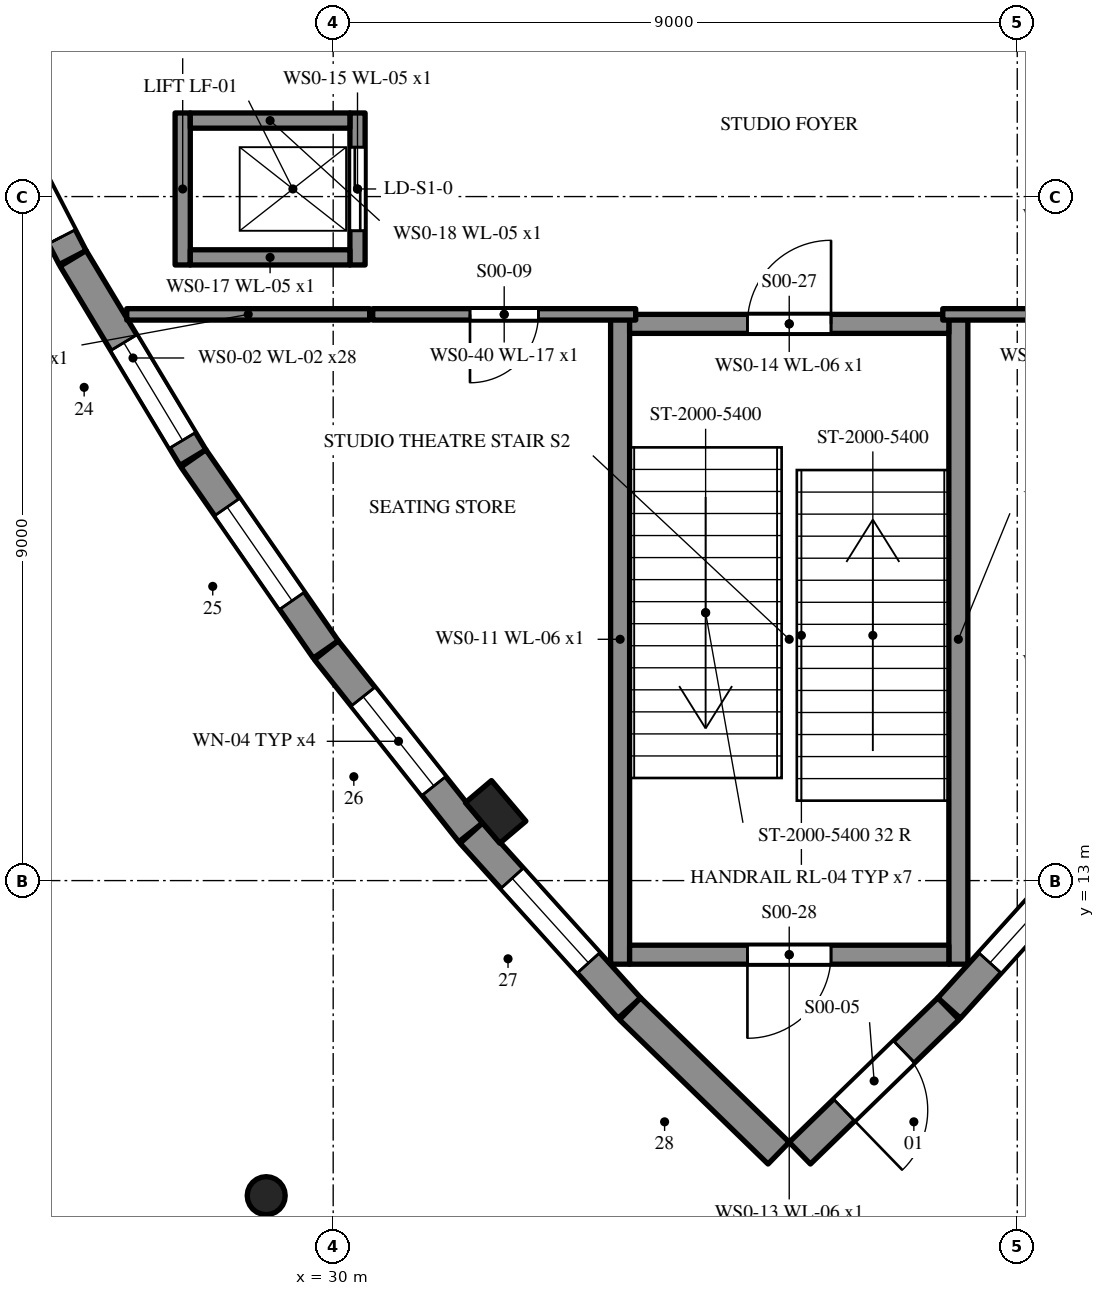
"""IFC4 building model, lengths in metres.
Left out: names, types, materials, properties, quantities, classifications, styles, units other than length and angle.
Written with IfcOpenShell. Run it as: python <this file> out.ifc"""

import sys

from ifc_helpers import new_model, si_unit, direction, frame, frame_2d, origin, origin_2d, place, context, subcontext, project, spatial, rectangle, circle, extrude, element, fill, save


model = new_model("IFC4")
c1 = context("Model", 3, precision=1e-05, world=origin(), true_north=direction((0.0, 1.0)))
c2 = subcontext(c1, "Body", "Model", "MODEL_VIEW")
j1 = project(units=[si_unit("LENGTHUNIT", "METRE"), si_unit("PLANEANGLEUNIT", "RADIAN")], contexts=[c1])
p1 = place(None, origin())
s1 = spatial("IfcSite", under=j1, at=p1, CompositionType="ELEMENT")
p2 = place(p1, origin())
s2 = spatial("IfcBuilding", under=s1, at=p2, CompositionType="ELEMENT")
p3 = place(p2, origin())
s3 = spatial("IfcBuildingStorey", under=s2, at=p3, CompositionType="ELEMENT", Elevation=0.0)
p4 = place(p3, frame((29.119, 8.854, -0.25), z_axis=(0.0, 0.0, 1.0), x_axis=(1.0, 0.0, 0.0)))
e1 = element("IfcColumn", 1, at=p4, inside=s3, PredefinedType="COLUMN", context=c2, shape_type="SweptSolid", body=[
    extrude(circle(Radius=0.25, at=origin_2d()), origin(), (0.0, 0.0, 1.0), 5.45),
])
p5 = place(p3, frame((36.139, 9.414, 0.0), z_axis=(0.0, 0.0, 1.0), x_axis=(0.717243568607, 0.696822547922, 0.0)))
e2 = element("IfcWall", 2, at=p5, inside=s3, PredefinedType="SOLIDWALL", context=c2, shape_type="SweptSolid", body=[
    extrude(rectangle(XDim=2.726, YDim=0.4, at=frame_2d((1.363, 0.0))), origin(), (0.0, 0.0, 1.0), 5.1),
])
p6 = place(p5, frame((0.813, 0.0, 0.0)))
e3 = element("IfcOpeningElement", 3, at=p6, cuts=e2, PredefinedType="OPENING", context=c2, shape_type="SweptSolid", body=[
    extrude(rectangle(XDim=1.1, YDim=2.1, at=frame_2d((0.55, 1.05))), frame((0.0, 0.21, 0.0), z_axis=(0.0, -1.0, 0.0), x_axis=(1.0, 0.0, 0.0)), (0.0, 0.0, 1.0), 0.42),
])
p7 = place(p3, frame((38.104, 11.323, 0.0), z_axis=(0.0, 0.0, 1.0), x_axis=(0.67038553216, 0.742012963681, 0.0)))
e4 = element("IfcWall", 4, at=p7, inside=s3, PredefinedType="SOLIDWALL", context=c2, shape_type="SweptSolid", body=[
    extrude(rectangle(XDim=3.102, YDim=0.4, at=frame_2d((1.551, 0.0))), origin(), (0.0, 0.0, 1.0), 5.1),
])
p8 = place(p7, frame((0.801, 0.0, 2.4)))
e5 = element("IfcOpeningElement", 5, at=p8, cuts=e4, PredefinedType="OPENING", context=c2, shape_type="SweptSolid", body=[
    extrude(rectangle(XDim=1.5, YDim=0.9, at=frame_2d((0.75, 0.45))), frame((0.0, 0.21, 0.0), z_axis=(0.0, -1.0, 0.0), x_axis=(1.0, 0.0, 0.0)), (0.0, 0.0, 1.0), 0.42),
])
p9 = place(p3, frame((25.167, 23.914, 0.0), z_axis=(0.0, 0.0, 1.0), x_axis=(0.45930565039, -0.888278289457, 0.0)))
e6 = element("IfcWall", 6, at=p9, inside=s3, PredefinedType="SOLIDWALL", context=c2, shape_type="SweptSolid", body=[
    extrude(rectangle(XDim=3.059, YDim=0.4, at=frame_2d((1.529, 0.0))), origin(), (0.0, 0.0, 1.0), 5.1),
])
p10 = place(p9, frame((0.15, 0.0, 0.0)))
e7 = element("IfcOpeningElement", 7, at=p10, cuts=e6, PredefinedType="OPENING", context=c2, shape_type="SweptSolid", body=[
    extrude(rectangle(XDim=2.6, YDim=2.4, at=frame_2d((1.3, 1.2))), frame((0.0, 0.21, 0.0), z_axis=(0.0, -1.0, 0.0), x_axis=(1.0, 0.0, 0.0)), (0.0, 0.0, 1.0), 0.42),
])
p11 = place(p3, frame((26.578, 21.186, 0.0), z_axis=(0.0, 0.0, 1.0), x_axis=(0.515387841983, -0.856957042293, 0.0)))
e8 = element("IfcWall", 8, at=p11, inside=s3, PredefinedType="SOLIDWALL", context=c2, shape_type="SweptSolid", body=[
    extrude(rectangle(XDim=3.058, YDim=0.4, at=frame_2d((1.529, 0.0))), origin(), (0.0, 0.0, 1.0), 5.1),
])
p12 = place(p11, frame((1.294, 0.0, 2.4)))
e9 = element("IfcOpeningElement", 9, at=p12, cuts=e8, PredefinedType="OPENING", context=c2, shape_type="SweptSolid", body=[
    extrude(rectangle(XDim=1.5, YDim=0.9, at=frame_2d((0.75, 0.45))), frame((0.0, 0.21, 0.0), z_axis=(0.0, -1.0, 0.0), x_axis=(1.0, 0.0, 0.0)), (0.0, 0.0, 1.0), 0.42),
])
p13 = place(p3, frame((28.161, 18.555, 0.0), z_axis=(0.0, 0.0, 1.0), x_axis=(0.569371892655, -0.822080073871, 0.0)))
e10 = element("IfcWall", 10, at=p13, inside=s3, PredefinedType="SOLIDWALL", context=c2, shape_type="SweptSolid", body=[
    extrude(rectangle(XDim=3.058, YDim=0.4, at=frame_2d((1.529, 0.0))), origin(), (0.0, 0.0, 1.0), 5.1),
])
p14 = place(p13, frame((0.779, 0.0, 2.4)))
e11 = element("IfcOpeningElement", 11, at=p14, cuts=e10, PredefinedType="OPENING", context=c2, shape_type="SweptSolid", body=[
    extrude(rectangle(XDim=1.5, YDim=0.9, at=frame_2d((0.75, 0.45))), frame((0.0, 0.21, 0.0), z_axis=(0.0, -1.0, 0.0), x_axis=(1.0, 0.0, 0.0)), (0.0, 0.0, 1.0), 0.42),
])
p15 = place(p3, frame((29.91, 16.031, 0.0), z_axis=(0.0, 0.0, 1.0), x_axis=(0.620958553355, -0.783843399548, 0.0)))
e12 = element("IfcWall", 12, at=p15, inside=s3, PredefinedType="SOLIDWALL", context=c2, shape_type="SweptSolid", body=[
    extrude(rectangle(XDim=3.058, YDim=0.4, at=frame_2d((1.529, 0.0))), origin(), (0.0, 0.0, 1.0), 5.1),
])
p16 = place(p15, frame((0.779, 0.0, 2.4)))
e13 = element("IfcOpeningElement", 13, at=p16, cuts=e12, PredefinedType="OPENING", context=c2, shape_type="SweptSolid", body=[
    extrude(rectangle(XDim=1.5, YDim=0.9, at=frame_2d((0.75, 0.45))), frame((0.0, 0.21, 0.0), z_axis=(0.0, -1.0, 0.0), x_axis=(1.0, 0.0, 0.0)), (0.0, 0.0, 1.0), 0.42),
])
p17 = place(p3, frame((31.817, 13.625, 0.0), z_axis=(0.0, 0.0, 1.0), x_axis=(0.67038553216, -0.742012963681, 0.0)))
e14 = element("IfcWall", 14, at=p17, inside=s3, PredefinedType="SOLIDWALL", context=c2, shape_type="SweptSolid", body=[
    extrude(rectangle(XDim=3.102, YDim=0.4, at=frame_2d((1.551, 0.0))), origin(), (0.0, 0.0, 1.0), 5.1),
])
p18 = place(p17, frame((0.801, 0.0, 2.4)))
e15 = element("IfcOpeningElement", 15, at=p18, cuts=e14, PredefinedType="OPENING", context=c2, shape_type="SweptSolid", body=[
    extrude(rectangle(XDim=1.5, YDim=0.9, at=frame_2d((0.75, 0.45))), frame((0.0, 0.21, 0.0), z_axis=(0.0, -1.0, 0.0), x_axis=(1.0, 0.0, 0.0)), (0.0, 0.0, 1.0), 0.42),
])
p19 = place(p3, frame((33.906, 11.314, 0.0), z_axis=(0.0, 0.0, 1.0), x_axis=(0.717243568607, -0.696822547922, 0.0)))
e16 = element("IfcWall", 16, at=p19, inside=s3, PredefinedType="SOLIDWALL", context=c2, shape_type="SweptSolid", body=[
    extrude(rectangle(XDim=2.726, YDim=0.4, at=frame_2d((1.363, 0.0))), origin(), (0.0, 0.0, 1.0), 5.1),
])
p20 = place(p3, frame((32.137, 13.904, 0.0), z_axis=(0.0, 0.0, 1.0), x_axis=(0.646183644891, -0.763181955418, 0.0)))
e17 = element("IfcColumn", 17, at=p20, inside=s3, PredefinedType="PILASTER", context=c2, shape_type="SweptSolid", body=[
    extrude(rectangle(XDim=0.7, YDim=0.45, at=origin_2d()), origin(), (0.0, 0.0, 1.0), 5.1),
])
for number, where, z_axis, x_axis in (
    (18, (33.775, 20.45, 0.0), (0.0, 0.0, 1.0), (0.0, -1.0, 0.0)),
    (19, (38.225, 11.9, 0.0), (0.0, 0.0, 1.0), (0.0, 1.0, 0.0)),
):
    element("IfcWall", number, at=place(p3, frame(where, z_axis=z_axis, x_axis=x_axis)), inside=s3, PredefinedType="SHEAR", context=c2, shape_type="SweptSolid", body=[
        extrude(rectangle(XDim=8.55, YDim=0.25, at=frame_2d((4.275, 0.0))), origin(), (0.0, 0.0, 1.0), 5.4),
    ])
p21 = place(p3, frame((38.1, 12.025, 0.0), z_axis=(0.0, 0.0, 1.0), x_axis=(-1.0, 0.0, 0.0)))
e20 = element("IfcWall", 20, at=p21, inside=s3, PredefinedType="SHEAR", context=c2, shape_type="SweptSolid", body=[
    extrude(rectangle(XDim=4.2, YDim=0.25, at=frame_2d((2.1, 0.0))), origin(), (0.0, 0.0, 1.0), 5.4),
])
p22 = place(p21, frame((1.55, 0.0, 0.0)))
e21 = element("IfcOpeningElement", 21, at=p22, cuts=e20, PredefinedType="OPENING", context=c2, shape_type="SweptSolid", body=[
    extrude(rectangle(XDim=1.1, YDim=2.1, at=frame_2d((0.55, 1.05))), frame((0.0, 0.135, 0.0), z_axis=(0.0, -1.0, 0.0), x_axis=(1.0, 0.0, 0.0)), (0.0, 0.0, 1.0), 0.27),
])
p23 = place(p3, frame((33.9, 20.325, 0.0), z_axis=(0.0, 0.0, 1.0), x_axis=(1.0, 0.0, 0.0)))
e22 = element("IfcWall", 22, at=p23, inside=s3, PredefinedType="SHEAR", context=c2, shape_type="SweptSolid", body=[
    extrude(rectangle(XDim=4.2, YDim=0.25, at=frame_2d((2.1, 0.0))), origin(), (0.0, 0.0, 1.0), 5.4),
])
p24 = place(p23, frame((1.55, 0.0, 0.0)))
e23 = element("IfcOpeningElement", 23, at=p24, cuts=e22, PredefinedType="OPENING", context=c2, shape_type="SweptSolid", body=[
    extrude(rectangle(XDim=1.1, YDim=2.1, at=frame_2d((0.55, 1.05))), frame((0.0, 0.135, 0.0), z_axis=(0.0, -1.0, 0.0), x_axis=(1.0, 0.0, 0.0)), (0.0, 0.0, 1.0), 0.27),
])
p25 = place(p3, frame((30.32, 21.1, -1.2), z_axis=(0.0, 0.0, 1.0), x_axis=(0.0, 1.0, 0.0)))
e24 = element("IfcWall", 24, at=p25, inside=s3, PredefinedType="SHEAR", context=c2, shape_type="SweptSolid", body=[
    extrude(rectangle(XDim=2.0, YDim=0.2, at=frame_2d((1.0, 0.0))), origin(), (0.0, 0.0, 1.0), 6.3),
])
p26 = place(p25, frame((0.45, 0.0, 1.2)))
e25 = element("IfcOpeningElement", 25, at=p26, cuts=e24, PredefinedType="OPENING", context=c2, shape_type="SweptSolid", body=[
    extrude(rectangle(XDim=1.1, YDim=2.2, at=frame_2d((0.55, 1.1))), frame((0.0, 0.11, 0.0), z_axis=(0.0, -1.0, 0.0), x_axis=(1.0, 0.0, 0.0)), (0.0, 0.0, 1.0), 0.22),
])
p27 = place(p3, frame((28.02, 23.1, -1.2), z_axis=(0.0, 0.0, 1.0), x_axis=(0.0, -1.0, 0.0)))
e26 = element("IfcWall", 26, at=p27, inside=s3, PredefinedType="SHEAR", context=c2, shape_type="SweptSolid", body=[
    extrude(rectangle(XDim=2.0, YDim=0.2, at=frame_2d((1.0, 0.0))), origin(), (0.0, 0.0, 1.0), 6.3),
])
for number, where, z_axis, x_axis in (
    (27, (28.12, 21.2, -1.2), (0.0, 0.0, 1.0), (1.0, 0.0, 0.0)),
    (28, (30.22, 23.0, -1.2), (0.0, 0.0, 1.0), (-1.0, 0.0, 0.0)),
):
    element("IfcWall", number, at=place(p3, frame(where, z_axis=z_axis, x_axis=x_axis)), inside=s3, PredefinedType="SHEAR", context=c2, shape_type="SweptSolid", body=[
        extrude(rectangle(XDim=2.1, YDim=0.2, at=frame_2d((1.05, 0.0))), origin(), (0.0, 0.0, 1.0), 6.3),
    ])
p28 = place(p3, frame((33.98, 20.45, 0.0), z_axis=(0.0, 0.0, 1.0), x_axis=(-1.0, 0.0, 0.0)))
e29 = element("IfcWall", 29, at=p28, inside=s3, PredefinedType="PARTITIONING", context=c2, shape_type="SweptSolid", body=[
    extrude(rectangle(XDim=3.46, YDim=0.15, at=frame_2d((1.73, 0.0))), origin(), (0.0, 0.0, 1.0), 5.1),
])
p29 = place(p28, frame((1.28, 0.0, 0.0)))
e30 = element("IfcOpeningElement", 30, at=p29, cuts=e29, PredefinedType="OPENING", context=c2, shape_type="SweptSolid", body=[
    extrude(rectangle(XDim=0.9, YDim=2.1, at=frame_2d((0.45, 1.05))), frame((0.0, 0.085, 0.0), z_axis=(0.0, -1.0, 0.0), x_axis=(1.0, 0.0, 0.0)), (0.0, 0.0, 1.0), 0.17),
])
p30 = place(p3, frame((41.48, 20.45, 0.0), z_axis=(0.0, 0.0, 1.0), x_axis=(-1.0, 0.0, 0.0)))
e31 = element("IfcWall", 31, at=p30, inside=s3, PredefinedType="PARTITIONING", context=c2, shape_type="SweptSolid", body=[
    extrude(rectangle(XDim=3.46, YDim=0.15, at=frame_2d((1.73, 0.0))), origin(), (0.0, 0.0, 1.0), 5.1),
])
p31 = place(p30, frame((1.28, 0.0, 0.0)))
e32 = element("IfcOpeningElement", 32, at=p31, cuts=e31, PredefinedType="OPENING", context=c2, shape_type="SweptSolid", body=[
    extrude(rectangle(XDim=0.9, YDim=2.1, at=frame_2d((0.45, 1.05))), frame((0.0, 0.085, 0.0), z_axis=(0.0, -1.0, 0.0), x_axis=(1.0, 0.0, 0.0)), (0.0, 0.0, 1.0), 0.17),
])
p32 = place(p3, frame((30.48, 20.45, 0.0), z_axis=(0.0, 0.0, 1.0), x_axis=(-1.0, 0.0, 0.0)))
e33 = element("IfcWall", 33, at=p32, inside=s3, PredefinedType="PARTITIONING", context=c2, shape_type="SweptSolid", body=[
    extrude(rectangle(XDim=3.196, YDim=0.15, at=frame_2d((1.598, 0.0))), origin(), (0.0, 0.0, 1.0), 5.1),
])
p33 = place(p10, frame((2.6, 0.0, 0.0), z_axis=(0.0, 0.0, 1.0), x_axis=(-1.0, 0.0, 0.0)))
e34 = element("IfcDoor", 34, at=p33, inside=s3, OperationType="DOUBLE_DOOR_SINGLE_SWING", PredefinedType="DOOR", context=c2, shape_type="SweptSolid", body=[
    extrude(rectangle(XDim=2.6, YDim=2.4, at=frame_2d((1.3, 1.2))), frame((0.0, 0.025, 0.0), z_axis=(0.0, -1.0, 0.0), x_axis=(1.0, 0.0, 0.0)), (0.0, 0.0, 1.0), 0.05),
])
fill(e7, e34)
p34 = place(p6, frame((1.1, 0.0, 0.0), z_axis=(0.0, 0.0, 1.0), x_axis=(-1.0, 0.0, 0.0)))
e35 = element("IfcDoor", 35, at=p34, inside=s3, OperationType="SINGLE_SWING_RIGHT", PredefinedType="DOOR", context=c2, shape_type="SweptSolid", body=[
    extrude(rectangle(XDim=1.1, YDim=2.1, at=frame_2d((0.55, 1.05))), frame((0.0, 0.025, 0.0), z_axis=(0.0, -1.0, 0.0), x_axis=(1.0, 0.0, 0.0)), (0.0, 0.0, 1.0), 0.05),
])
fill(e3, e35)
p35 = place(p8, origin())
e36 = element("IfcWindow", 36, at=p35, inside=s3, PartitioningType="SINGLE_PANEL", PredefinedType="WINDOW", context=c2, shape_type="SweptSolid", body=[
    extrude(rectangle(XDim=1.5, YDim=0.9, at=frame_2d((0.75, 0.45))), frame((0.0, 0.03, 0.0), z_axis=(0.0, -1.0, 0.0), x_axis=(1.0, 0.0, 0.0)), (0.0, 0.0, 1.0), 0.06),
])
fill(e5, e36)
p36 = place(p12, origin())
e37 = element("IfcWindow", 37, at=p36, inside=s3, PartitioningType="SINGLE_PANEL", PredefinedType="WINDOW", context=c2, shape_type="SweptSolid", body=[
    extrude(rectangle(XDim=1.5, YDim=0.9, at=frame_2d((0.75, 0.45))), frame((0.0, 0.03, 0.0), z_axis=(0.0, -1.0, 0.0), x_axis=(1.0, 0.0, 0.0)), (0.0, 0.0, 1.0), 0.06),
])
fill(e9, e37)
p37 = place(p14, origin())
e38 = element("IfcWindow", 38, at=p37, inside=s3, PartitioningType="SINGLE_PANEL", PredefinedType="WINDOW", context=c2, shape_type="SweptSolid", body=[
    extrude(rectangle(XDim=1.5, YDim=0.9, at=frame_2d((0.75, 0.45))), frame((0.0, 0.03, 0.0), z_axis=(0.0, -1.0, 0.0), x_axis=(1.0, 0.0, 0.0)), (0.0, 0.0, 1.0), 0.06),
])
fill(e11, e38)
p38 = place(p16, origin())
e39 = element("IfcWindow", 39, at=p38, inside=s3, PartitioningType="SINGLE_PANEL", PredefinedType="WINDOW", context=c2, shape_type="SweptSolid", body=[
    extrude(rectangle(XDim=1.5, YDim=0.9, at=frame_2d((0.75, 0.45))), frame((0.0, 0.03, 0.0), z_axis=(0.0, -1.0, 0.0), x_axis=(1.0, 0.0, 0.0)), (0.0, 0.0, 1.0), 0.06),
])
fill(e13, e39)
p39 = place(p18, origin())
e40 = element("IfcWindow", 40, at=p39, inside=s3, PartitioningType="SINGLE_PANEL", PredefinedType="WINDOW", context=c2, shape_type="SweptSolid", body=[
    extrude(rectangle(XDim=1.5, YDim=0.9, at=frame_2d((0.75, 0.45))), frame((0.0, 0.03, 0.0), z_axis=(0.0, -1.0, 0.0), x_axis=(1.0, 0.0, 0.0)), (0.0, 0.0, 1.0), 0.06),
])
fill(e15, e40)
p40 = place(p26, origin())
e41 = element("IfcDoor", 41, at=p40, inside=s3, OperationType="SLIDING_TO_LEFT", PredefinedType="DOOR", context=c2, shape_type="SweptSolid", body=[
    extrude(rectangle(XDim=1.1, YDim=2.2, at=frame_2d((0.55, 1.1))), frame((0.0, 0.025, 0.0), z_axis=(0.0, -1.0, 0.0), x_axis=(1.0, 0.0, 0.0)), (0.0, 0.0, 1.0), 0.05),
])
fill(e25, e41)
p41 = place(p29, origin())
e42 = element("IfcDoor", 42, at=p41, inside=s3, OperationType="SINGLE_SWING_RIGHT", PredefinedType="DOOR", context=c2, shape_type="SweptSolid", body=[
    extrude(rectangle(XDim=0.9, YDim=2.1, at=frame_2d((0.45, 1.05))), frame((0.0, 0.025, 0.0), z_axis=(0.0, -1.0, 0.0), x_axis=(1.0, 0.0, 0.0)), (0.0, 0.0, 1.0), 0.05),
])
fill(e30, e42)
p42 = place(p24, origin())
e43 = element("IfcDoor", 43, at=p42, inside=s3, OperationType="SINGLE_SWING_RIGHT", PredefinedType="DOOR", context=c2, shape_type="SweptSolid", body=[
    extrude(rectangle(XDim=1.1, YDim=2.1, at=frame_2d((0.55, 1.05))), frame((0.0, 0.025, 0.0), z_axis=(0.0, -1.0, 0.0), x_axis=(1.0, 0.0, 0.0)), (0.0, 0.0, 1.0), 0.05),
])
fill(e23, e43)
p43 = place(p22, origin())
e44 = element("IfcDoor", 44, at=p43, inside=s3, OperationType="SINGLE_SWING_RIGHT", PredefinedType="DOOR", context=c2, shape_type="SweptSolid", body=[
    extrude(rectangle(XDim=1.1, YDim=2.1, at=frame_2d((0.55, 1.05))), frame((0.0, 0.025, 0.0), z_axis=(0.0, -1.0, 0.0), x_axis=(1.0, 0.0, 0.0)), (0.0, 0.0, 1.0), 0.05),
])
fill(e21, e44)
save(model, sys.argv[1])
